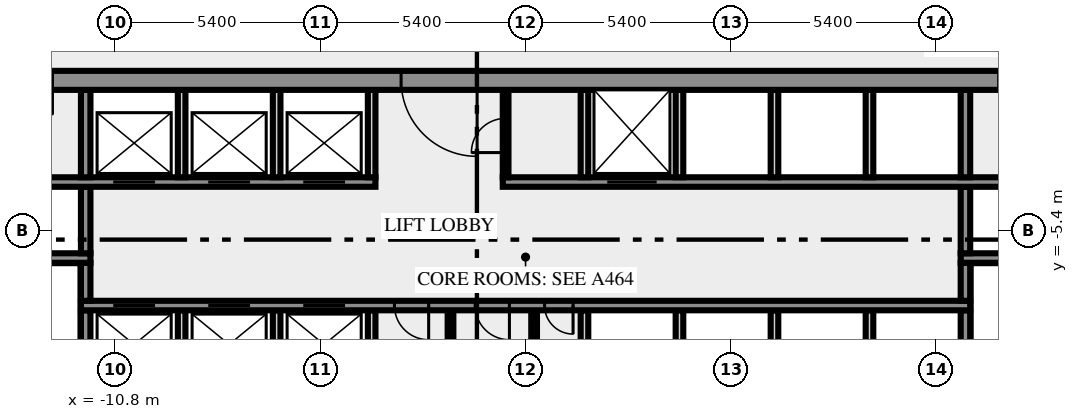
"""IFC4 building model, lengths in metres.
Left out: names, types, materials, properties, quantities, classifications, styles, units other than length and angle.
Written with IfcOpenShell. Run it as: python <this file> out.ifc"""

import sys

from ifc_helpers import new_model, si_unit, direction, frame, frame_2d, origin, place, context, subcontext, project, spatial, rectangle, extrude, element, fill, save


model = new_model("IFC4")
c1 = context("Model", 3, precision=1e-05, world=origin(), true_north=direction((0.0, 1.0)))
c2 = subcontext(c1, "Body", "Model", "MODEL_VIEW")
j1 = project(units=[si_unit("LENGTHUNIT", "METRE"), si_unit("PLANEANGLEUNIT", "RADIAN")], contexts=[c1])
p1 = place(None, origin())
s1 = spatial("IfcSite", under=j1, at=p1, CompositionType="ELEMENT")
p2 = place(p1, origin())
s2 = spatial("IfcBuilding", under=s1, at=p2, CompositionType="ELEMENT")
p3 = place(p2, frame((0.0, 0.0, 85.0)))
s3 = spatial("IfcBuildingStorey", under=s2, at=p3, CompositionType="ELEMENT", Elevation=85.0)
p4 = place(p3, frame((-11.575, -10.5, 0.0), z_axis=(0.0, 0.0, 1.0), x_axis=(0.0, 1.0, 0.0)))
e1 = element("IfcWall", 1, at=p4, inside=s3, PredefinedType="SHEAR", context=c2, shape_type="SweptSolid", body=[
    extrude(rectangle(XDim=3.0, YDim=0.25, at=frame_2d((1.5, 0.0))), origin(), (0.0, 0.0, 1.0), 3.65),
])
for number, where, z_axis, x_axis in (
    (2, (-9.05, -10.5, 0.0), (0.0, 0.0, 1.0), (0.0, 1.0, 0.0)),
    (3, (-6.55, -10.5, 0.0), (0.0, 0.0, 1.0), (0.0, 1.0, 0.0)),
    (4, (-4.05, -10.5, 0.0), (0.0, 0.0, 1.0), (0.0, 1.0, 0.0)),
):
    element("IfcWall", number, at=place(p3, frame(where, z_axis=z_axis, x_axis=x_axis)), inside=s3, PredefinedType="SOLIDWALL", context=c2, shape_type="SweptSolid", body=[
        extrude(rectangle(XDim=3.0, YDim=0.2, at=frame_2d((1.5, 0.0))), origin(), (0.0, 0.0, 1.0), 3.65),
    ])
for number, where, z_axis, x_axis in (
    (5, (-1.975, -10.5, 0.0), (0.0, 0.0, 1.0), (0.0, 1.0, 0.0)),
    (6, (0.225, -10.5, 0.0), (0.0, 0.0, 1.0), (0.0, 1.0, 0.0)),
):
    element("IfcWall", number, at=place(p3, frame(where, z_axis=z_axis, x_axis=x_axis)), inside=s3, PredefinedType="PARTITIONING", context=c2, shape_type="SweptSolid", body=[
        extrude(rectangle(XDim=3.0, YDim=0.15, at=frame_2d((1.5, 0.0))), origin(), (0.0, 0.0, 1.0), 3.65),
    ])
for number, where, z_axis, x_axis in (
    (7, (1.55, -10.5, 0.0), (0.0, 0.0, 1.0), (0.0, 1.0, 0.0)),
    (8, (4.05, -10.5, 0.0), (0.0, 0.0, 1.0), (0.0, 1.0, 0.0)),
    (9, (6.55, -10.5, 0.0), (0.0, 0.0, 1.0), (0.0, 1.0, 0.0)),
    (10, (9.05, -10.5, 0.0), (0.0, 0.0, 1.0), (0.0, 1.0, 0.0)),
):
    element("IfcWall", number, at=place(p3, frame(where, z_axis=z_axis, x_axis=x_axis)), inside=s3, PredefinedType="SOLIDWALL", context=c2, shape_type="SweptSolid", body=[
        extrude(rectangle(XDim=3.0, YDim=0.2, at=frame_2d((1.5, 0.0))), origin(), (0.0, 0.0, 1.0), 3.65),
    ])
p5 = place(p3, frame((11.575, -10.5, 0.0), z_axis=(0.0, 0.0, 1.0), x_axis=(0.0, 1.0, 0.0)))
e11 = element("IfcWall", 11, at=p5, inside=s3, PredefinedType="SHEAR", context=c2, shape_type="SweptSolid", body=[
    extrude(rectangle(XDim=3.0, YDim=0.25, at=frame_2d((1.5, 0.0))), origin(), (0.0, 0.0, 1.0), 3.65),
])
p6 = place(p3, frame((11.7, -7.375, 0.0), z_axis=(0.0, 0.0, 1.0), x_axis=(-1.0, 0.0, 0.0)))
e12 = element("IfcWall", 12, at=p6, inside=s3, PredefinedType="SHEAR", context=c2, shape_type="SweptSolid", body=[
    extrude(rectangle(XDim=23.4, YDim=0.25, at=frame_2d((11.7, 0.0))), origin(), (0.0, 0.0, 1.0), 3.65),
])
p7 = place(p6, frame((21.45, 0.0, 0.0)))
e13 = element("IfcOpeningElement", 13, at=p7, cuts=e12, PredefinedType="OPENING", context=c2, shape_type="SweptSolid", body=[
    extrude(rectangle(XDim=1.1, YDim=2.1, at=frame_2d((0.55, 1.05))), frame((0.0, 0.135, 0.0), z_axis=(0.0, -1.0, 0.0), x_axis=(1.0, 0.0, 0.0)), (0.0, 0.0, 1.0), 0.27),
])
p8 = place(p6, frame((18.95, 0.0, 0.0)))
e14 = element("IfcOpeningElement", 14, at=p8, cuts=e12, PredefinedType="OPENING", context=c2, shape_type="SweptSolid", body=[
    extrude(rectangle(XDim=1.1, YDim=2.1, at=frame_2d((0.55, 1.05))), frame((0.0, 0.135, 0.0), z_axis=(0.0, -1.0, 0.0), x_axis=(1.0, 0.0, 0.0)), (0.0, 0.0, 1.0), 0.27),
])
p9 = place(p6, frame((16.45, 0.0, 0.0)))
e15 = element("IfcOpeningElement", 15, at=p9, cuts=e12, PredefinedType="OPENING", context=c2, shape_type="SweptSolid", body=[
    extrude(rectangle(XDim=1.1, YDim=2.1, at=frame_2d((0.55, 1.05))), frame((0.0, 0.135, 0.0), z_axis=(0.0, -1.0, 0.0), x_axis=(1.0, 0.0, 0.0)), (0.0, 0.0, 1.0), 0.27),
])
p10 = place(p6, frame((14.25, 0.0, 0.0)))
e16 = element("IfcOpeningElement", 16, at=p10, cuts=e12, PredefinedType="OPENING", context=c2, shape_type="SweptSolid", body=[
    extrude(rectangle(XDim=0.9, YDim=2.1, at=frame_2d((0.45, 1.05))), frame((0.0, 0.135, 0.0), z_axis=(0.0, -1.0, 0.0), x_axis=(1.0, 0.0, 0.0)), (0.0, 0.0, 1.0), 0.27),
])
p11 = place(p6, frame((12.125, 0.0, 0.0)))
e17 = element("IfcOpeningElement", 17, at=p11, cuts=e12, PredefinedType="OPENING", context=c2, shape_type="SweptSolid", body=[
    extrude(rectangle(XDim=0.9, YDim=2.1, at=frame_2d((0.45, 1.05))), frame((0.0, 0.135, 0.0), z_axis=(0.0, -1.0, 0.0), x_axis=(1.0, 0.0, 0.0)), (0.0, 0.0, 1.0), 0.27),
])
p12 = place(p6, frame((10.45, 0.0, 0.0)))
e18 = element("IfcOpeningElement", 18, at=p12, cuts=e12, PredefinedType="OPENING", context=c2, shape_type="SweptSolid", body=[
    extrude(rectangle(XDim=0.75, YDim=2.1, at=frame_2d((0.375, 1.05))), frame((0.0, 0.135, 0.0), z_axis=(0.0, -1.0, 0.0), x_axis=(1.0, 0.0, 0.0)), (0.0, 0.0, 1.0), 0.27),
])
for number, where, z_axis, x_axis in (
    (19, (-11.575, -7.25, 0.0), (0.0, 0.0, 1.0), (0.0, 1.0, 0.0)),
    (20, (11.575, -7.25, 0.0), (0.0, 0.0, 1.0), (0.0, 1.0, 0.0)),
):
    element("IfcWall", number, at=place(p3, frame(where, z_axis=z_axis, x_axis=x_axis)), inside=s3, PredefinedType="SHEAR", context=c2, shape_type="SweptSolid", body=[
        extrude(rectangle(XDim=1.0, YDim=0.25, at=frame_2d((0.5, 0.0))), origin(), (0.0, 0.0, 1.0), 3.65),
    ])
p13 = place(p3, frame((-11.45, -6.125, 0.0), z_axis=(0.0, 0.0, 1.0), x_axis=(-1.0, 0.0, 0.0)))
e21 = element("IfcWall", 21, at=p13, inside=s3, PredefinedType="SHEAR", context=c2, shape_type="SweptSolid", body=[
    extrude(rectangle(XDim=8.05, YDim=0.25, at=frame_2d((4.025, 0.0))), origin(), (0.0, 0.0, 1.0), 3.65),
])
p14 = place(p13, frame((6.2, 0.0, 0.0)))
e22 = element("IfcOpeningElement", 22, at=p14, cuts=e21, PredefinedType="OPENING", context=c2, shape_type="SweptSolid", body=[
    extrude(rectangle(XDim=1.8, YDim=2.1, at=frame_2d((0.9, 1.05))), frame((0.0, 0.135, 0.0), z_axis=(0.0, -1.0, 0.0), x_axis=(1.0, 0.0, 0.0)), (0.0, 0.0, 1.0), 0.27),
])
p15 = place(p3, frame((19.5, -6.125, 0.0), z_axis=(0.0, 0.0, 1.0), x_axis=(-1.0, 0.0, 0.0)))
e23 = element("IfcWall", 23, at=p15, inside=s3, PredefinedType="SHEAR", context=c2, shape_type="SweptSolid", body=[
    extrude(rectangle(XDim=8.05, YDim=0.25, at=frame_2d((4.025, 0.0))), origin(), (0.0, 0.0, 1.0), 3.65),
])
p16 = place(p15, frame((0.05, 0.0, 0.0)))
e24 = element("IfcOpeningElement", 24, at=p16, cuts=e23, PredefinedType="OPENING", context=c2, shape_type="SweptSolid", body=[
    extrude(rectangle(XDim=1.8, YDim=2.1, at=frame_2d((0.9, 1.05))), frame((0.0, 0.135, 0.0), z_axis=(0.0, -1.0, 0.0), x_axis=(1.0, 0.0, 0.0)), (0.0, 0.0, 1.0), 0.27),
])
for number, where, z_axis, x_axis in (
    (25, (-11.575, -6.0, 0.0), (0.0, 0.0, 1.0), (0.0, 1.0, 0.0)),
    (26, (11.575, -6.0, 0.0), (0.0, 0.0, 1.0), (0.0, 1.0, 0.0)),
):
    element("IfcWall", number, at=place(p3, frame(where, z_axis=z_axis, x_axis=x_axis)), inside=s3, PredefinedType="SHEAR", context=c2, shape_type="SweptSolid", body=[
        extrude(rectangle(XDim=1.75, YDim=0.25, at=frame_2d((0.875, 0.0))), origin(), (0.0, 0.0, 1.0), 3.65),
    ])
p17 = place(p3, frame((-14.35, -4.125, 0.0), z_axis=(0.0, 0.0, 1.0), x_axis=(1.0, 0.0, 0.0)))
e27 = element("IfcWall", 27, at=p17, inside=s3, PredefinedType="SHEAR", context=c2, shape_type="SweptSolid", body=[
    extrude(rectangle(XDim=10.4, YDim=0.25, at=frame_2d((5.2, 0.0))), origin(), (0.0, 0.0, 1.0), 3.65),
])
p18 = place(p17, frame((3.5, 0.0, 0.0)))
e28 = element("IfcOpeningElement", 28, at=p18, cuts=e27, PredefinedType="OPENING", context=c2, shape_type="SweptSolid", body=[
    extrude(rectangle(XDim=1.1, YDim=2.1, at=frame_2d((0.55, 1.05))), frame((0.0, 0.135, 0.0), z_axis=(0.0, -1.0, 0.0), x_axis=(1.0, 0.0, 0.0)), (0.0, 0.0, 1.0), 0.27),
])
p19 = place(p17, frame((6.0, 0.0, 0.0)))
e29 = element("IfcOpeningElement", 29, at=p19, cuts=e27, PredefinedType="OPENING", context=c2, shape_type="SweptSolid", body=[
    extrude(rectangle(XDim=1.1, YDim=2.1, at=frame_2d((0.55, 1.05))), frame((0.0, 0.135, 0.0), z_axis=(0.0, -1.0, 0.0), x_axis=(1.0, 0.0, 0.0)), (0.0, 0.0, 1.0), 0.27),
])
p20 = place(p17, frame((8.5, 0.0, 0.0)))
e30 = element("IfcOpeningElement", 30, at=p20, cuts=e27, PredefinedType="OPENING", context=c2, shape_type="SweptSolid", body=[
    extrude(rectangle(XDim=1.1, YDim=2.1, at=frame_2d((0.55, 1.05))), frame((0.0, 0.135, 0.0), z_axis=(0.0, -1.0, 0.0), x_axis=(1.0, 0.0, 0.0)), (0.0, 0.0, 1.0), 0.27),
])
p21 = place(p3, frame((-0.6, -4.125, 0.0), z_axis=(0.0, 0.0, 1.0), x_axis=(1.0, 0.0, 0.0)))
e31 = element("IfcWall", 31, at=p21, inside=s3, PredefinedType="SHEAR", context=c2, shape_type="SweptSolid", body=[
    extrude(rectangle(XDim=14.95, YDim=0.25, at=frame_2d((7.475, 0.0))), origin(), (0.0, 0.0, 1.0), 3.65),
])
p22 = place(p21, frame((2.75, 0.0, 0.0)))
e32 = element("IfcOpeningElement", 32, at=p22, cuts=e31, PredefinedType="OPENING", context=c2, shape_type="SweptSolid", body=[
    extrude(rectangle(XDim=1.3, YDim=2.1, at=frame_2d((0.65, 1.05))), frame((0.0, 0.135, 0.0), z_axis=(0.0, -1.0, 0.0), x_axis=(1.0, 0.0, 0.0)), (0.0, 0.0, 1.0), 0.27),
])
p23 = place(p3, frame((-11.575, -4.0, 0.0), z_axis=(0.0, 0.0, 1.0), x_axis=(0.0, 1.0, 0.0)))
e33 = element("IfcWall", 33, at=p23, inside=s3, PredefinedType="SHEAR", context=c2, shape_type="SweptSolid", body=[
    extrude(rectangle(XDim=2.3, YDim=0.25, at=frame_2d((1.15, 0.0))), origin(), (0.0, 0.0, 1.0), 3.65),
])
for number, where, z_axis, x_axis in (
    (34, (-9.05, -4.0, 0.0), (0.0, 0.0, 1.0), (0.0, 1.0, 0.0)),
    (35, (-6.55, -4.0, 0.0), (0.0, 0.0, 1.0), (0.0, 1.0, 0.0)),
    (36, (-4.05, -4.0, 0.0), (0.0, 0.0, 1.0), (0.0, 1.0, 0.0)),
):
    element("IfcWall", number, at=place(p3, frame(where, z_axis=z_axis, x_axis=x_axis)), inside=s3, PredefinedType="SOLIDWALL", context=c2, shape_type="SweptSolid", body=[
        extrude(rectangle(XDim=2.3, YDim=0.2, at=frame_2d((1.15, 0.0))), origin(), (0.0, 0.0, 1.0), 3.65),
    ])
p24 = place(p3, frame((-0.525, -4.0, 0.0), z_axis=(0.0, 0.0, 1.0), x_axis=(0.0, 1.0, 0.0)))
e37 = element("IfcWall", 37, at=p24, inside=s3, PredefinedType="PARTITIONING", context=c2, shape_type="SweptSolid", body=[
    extrude(rectangle(XDim=2.3, YDim=0.15, at=frame_2d((1.15, 0.0))), origin(), (0.0, 0.0, 1.0), 3.65),
])
p25 = place(p24, frame((0.65, 0.0, 0.0)))
e38 = element("IfcOpeningElement", 38, at=p25, cuts=e37, PredefinedType="OPENING", context=c2, shape_type="SweptSolid", body=[
    extrude(rectangle(XDim=0.9, YDim=2.1, at=frame_2d((0.45, 1.05))), frame((0.0, 0.085, 0.0), z_axis=(0.0, -1.0, 0.0), x_axis=(1.0, 0.0, 0.0)), (0.0, 0.0, 1.0), 0.17),
])
for number, where, z_axis, x_axis in (
    (39, (1.55, -4.0, 0.0), (0.0, 0.0, 1.0), (0.0, 1.0, 0.0)),
    (40, (4.05, -4.0, 0.0), (0.0, 0.0, 1.0), (0.0, 1.0, 0.0)),
    (41, (6.55, -4.0, 0.0), (0.0, 0.0, 1.0), (0.0, 1.0, 0.0)),
    (42, (9.05, -4.0, 0.0), (0.0, 0.0, 1.0), (0.0, 1.0, 0.0)),
):
    element("IfcWall", number, at=place(p3, frame(where, z_axis=z_axis, x_axis=x_axis)), inside=s3, PredefinedType="SOLIDWALL", context=c2, shape_type="SweptSolid", body=[
        extrude(rectangle(XDim=2.3, YDim=0.2, at=frame_2d((1.15, 0.0))), origin(), (0.0, 0.0, 1.0), 3.65),
    ])
p26 = place(p3, frame((11.575, -4.0, 0.0), z_axis=(0.0, 0.0, 1.0), x_axis=(0.0, 1.0, 0.0)))
e43 = element("IfcWall", 43, at=p26, inside=s3, PredefinedType="SHEAR", context=c2, shape_type="SweptSolid", body=[
    extrude(rectangle(XDim=2.3, YDim=0.25, at=frame_2d((1.15, 0.0))), origin(), (0.0, 0.0, 1.0), 3.65),
])
p27 = place(p3, frame((20.49, -1.45, 0.0), z_axis=(0.0, 0.0, 1.0), x_axis=(-1.0, 0.0, 0.0)))
e44 = element("IfcWall", 44, at=p27, inside=s3, PredefinedType="SHEAR", context=c2, shape_type="SweptSolid", body=[
    extrude(rectangle(XDim=40.98, YDim=0.5, at=frame_2d((20.49, 0.0))), origin(), (0.0, 0.0, 1.0), 3.65),
])
p28 = place(p27, frame((38.14, 0.0, 0.0)))
e45 = element("IfcOpeningElement", 45, at=p28, cuts=e44, PredefinedType="OPENING", context=c2, shape_type="SweptSolid", body=[
    extrude(rectangle(XDim=1.8, YDim=2.1, at=frame_2d((0.9, 1.05))), frame((0.0, 0.26, 0.0), z_axis=(0.0, -1.0, 0.0), x_axis=(1.0, 0.0, 0.0)), (0.0, 0.0, 1.0), 0.52),
])
p29 = place(p27, frame((35.89, 0.0, 0.0)))
e46 = element("IfcOpeningElement", 46, at=p29, cuts=e44, PredefinedType="OPENING", context=c2, shape_type="SweptSolid", body=[
    extrude(rectangle(XDim=0.9, YDim=2.1, at=frame_2d((0.45, 1.05))), frame((0.0, 0.26, 0.0), z_axis=(0.0, -1.0, 0.0), x_axis=(1.0, 0.0, 0.0)), (0.0, 0.0, 1.0), 0.52),
])
p30 = place(p27, frame((32.94, 0.0, 0.0)))
e47 = element("IfcOpeningElement", 47, at=p30, cuts=e44, PredefinedType="OPENING", context=c2, shape_type="SweptSolid", body=[
    extrude(rectangle(XDim=0.9, YDim=2.1, at=frame_2d((0.45, 1.05))), frame((0.0, 0.26, 0.0), z_axis=(0.0, -1.0, 0.0), x_axis=(1.0, 0.0, 0.0)), (0.0, 0.0, 1.0), 0.52),
])
p31 = place(p27, frame((21.765, 0.0, 0.0)))
e48 = element("IfcOpeningElement", 48, at=p31, cuts=e44, PredefinedType="OPENING", context=c2, shape_type="SweptSolid", body=[
    extrude(rectangle(XDim=2.0, YDim=2.1, at=frame_2d((1.0, 1.05))), frame((0.0, 0.26, 0.0), z_axis=(0.0, -1.0, 0.0), x_axis=(1.0, 0.0, 0.0)), (0.0, 0.0, 1.0), 0.52),
])
p32 = place(p27, frame((7.14, 0.0, 0.0)))
e49 = element("IfcOpeningElement", 49, at=p32, cuts=e44, PredefinedType="OPENING", context=c2, shape_type="SweptSolid", body=[
    extrude(rectangle(XDim=0.9, YDim=2.1, at=frame_2d((0.45, 1.05))), frame((0.0, 0.26, 0.0), z_axis=(0.0, -1.0, 0.0), x_axis=(1.0, 0.0, 0.0)), (0.0, 0.0, 1.0), 0.52),
])
p33 = place(p27, frame((5.028, 0.0, 0.0)))
e50 = element("IfcOpeningElement", 50, at=p33, cuts=e44, PredefinedType="OPENING", context=c2, shape_type="SweptSolid", body=[
    extrude(rectangle(XDim=0.8, YDim=2.1, at=frame_2d((0.4, 1.05))), frame((0.0, 0.26, 0.0), z_axis=(0.0, -1.0, 0.0), x_axis=(1.0, 0.0, 0.0)), (0.0, 0.0, 1.0), 0.52),
])
p34 = place(p27, frame((3.452, 0.0, 0.0)))
e51 = element("IfcOpeningElement", 51, at=p34, cuts=e44, PredefinedType="OPENING", context=c2, shape_type="SweptSolid", body=[
    extrude(rectangle(XDim=0.8, YDim=2.1, at=frame_2d((0.4, 1.05))), frame((0.0, 0.26, 0.0), z_axis=(0.0, -1.0, 0.0), x_axis=(1.0, 0.0, 0.0)), (0.0, 0.0, 1.0), 0.52),
])
p35 = place(p27, frame((1.04, 0.0, 0.0)))
e52 = element("IfcOpeningElement", 52, at=p35, cuts=e44, PredefinedType="OPENING", context=c2, shape_type="SweptSolid", body=[
    extrude(rectangle(XDim=1.8, YDim=2.1, at=frame_2d((0.9, 1.05))), frame((0.0, 0.26, 0.0), z_axis=(0.0, -1.0, 0.0), x_axis=(1.0, 0.0, 0.0)), (0.0, 0.0, 1.0), 0.52),
])
p36 = place(p7, origin())
e53 = element("IfcDoor", 53, at=p36, inside=s3, OperationType="DOUBLE_DOOR_SLIDING", PredefinedType="DOOR", context=c2, shape_type="SweptSolid", body=[
    extrude(rectangle(XDim=1.1, YDim=2.1, at=frame_2d((0.55, 1.05))), frame((0.0, 0.025, 0.0), z_axis=(0.0, -1.0, 0.0), x_axis=(1.0, 0.0, 0.0)), (0.0, 0.0, 1.0), 0.05),
])
fill(e13, e53)
p37 = place(p8, origin())
e54 = element("IfcDoor", 54, at=p37, inside=s3, OperationType="DOUBLE_DOOR_SLIDING", PredefinedType="DOOR", context=c2, shape_type="SweptSolid", body=[
    extrude(rectangle(XDim=1.1, YDim=2.1, at=frame_2d((0.55, 1.05))), frame((0.0, 0.025, 0.0), z_axis=(0.0, -1.0, 0.0), x_axis=(1.0, 0.0, 0.0)), (0.0, 0.0, 1.0), 0.05),
])
fill(e14, e54)
p38 = place(p9, origin())
e55 = element("IfcDoor", 55, at=p38, inside=s3, OperationType="DOUBLE_DOOR_SLIDING", PredefinedType="DOOR", context=c2, shape_type="SweptSolid", body=[
    extrude(rectangle(XDim=1.1, YDim=2.1, at=frame_2d((0.55, 1.05))), frame((0.0, 0.025, 0.0), z_axis=(0.0, -1.0, 0.0), x_axis=(1.0, 0.0, 0.0)), (0.0, 0.0, 1.0), 0.05),
])
fill(e15, e55)
p39 = place(p10, origin())
e56 = element("IfcDoor", 56, at=p39, inside=s3, OperationType="SINGLE_SWING_RIGHT", PredefinedType="DOOR", context=c2, shape_type="SweptSolid", body=[
    extrude(rectangle(XDim=0.9, YDim=2.1, at=frame_2d((0.45, 1.05))), frame((0.0, 0.025, 0.0), z_axis=(0.0, -1.0, 0.0), x_axis=(1.0, 0.0, 0.0)), (0.0, 0.0, 1.0), 0.05),
])
fill(e16, e56)
p40 = place(p11, origin())
e57 = element("IfcDoor", 57, at=p40, inside=s3, OperationType="SINGLE_SWING_RIGHT", PredefinedType="DOOR", context=c2, shape_type="SweptSolid", body=[
    extrude(rectangle(XDim=0.9, YDim=2.1, at=frame_2d((0.45, 1.05))), frame((0.0, 0.025, 0.0), z_axis=(0.0, -1.0, 0.0), x_axis=(1.0, 0.0, 0.0)), (0.0, 0.0, 1.0), 0.05),
])
fill(e17, e57)
p41 = place(p12, origin())
e58 = element("IfcDoor", 58, at=p41, inside=s3, OperationType="SINGLE_SWING_LEFT", PredefinedType="DOOR", context=c2, shape_type="SweptSolid", body=[
    extrude(rectangle(XDim=0.75, YDim=2.1, at=frame_2d((0.375, 1.05))), frame((0.0, 0.025, 0.0), z_axis=(0.0, -1.0, 0.0), x_axis=(1.0, 0.0, 0.0)), (0.0, 0.0, 1.0), 0.05),
])
fill(e18, e58)
p42 = place(p18, origin())
e59 = element("IfcDoor", 59, at=p42, inside=s3, OperationType="DOUBLE_DOOR_SLIDING", PredefinedType="DOOR", context=c2, shape_type="SweptSolid", body=[
    extrude(rectangle(XDim=1.1, YDim=2.1, at=frame_2d((0.55, 1.05))), frame((0.0, 0.025, 0.0), z_axis=(0.0, -1.0, 0.0), x_axis=(1.0, 0.0, 0.0)), (0.0, 0.0, 1.0), 0.05),
])
fill(e28, e59)
p43 = place(p19, origin())
e60 = element("IfcDoor", 60, at=p43, inside=s3, OperationType="DOUBLE_DOOR_SLIDING", PredefinedType="DOOR", context=c2, shape_type="SweptSolid", body=[
    extrude(rectangle(XDim=1.1, YDim=2.1, at=frame_2d((0.55, 1.05))), frame((0.0, 0.025, 0.0), z_axis=(0.0, -1.0, 0.0), x_axis=(1.0, 0.0, 0.0)), (0.0, 0.0, 1.0), 0.05),
])
fill(e29, e60)
p44 = place(p20, origin())
e61 = element("IfcDoor", 61, at=p44, inside=s3, OperationType="DOUBLE_DOOR_SLIDING", PredefinedType="DOOR", context=c2, shape_type="SweptSolid", body=[
    extrude(rectangle(XDim=1.1, YDim=2.1, at=frame_2d((0.55, 1.05))), frame((0.0, 0.025, 0.0), z_axis=(0.0, -1.0, 0.0), x_axis=(1.0, 0.0, 0.0)), (0.0, 0.0, 1.0), 0.05),
])
fill(e30, e61)
p45 = place(p22, origin())
e62 = element("IfcDoor", 62, at=p45, inside=s3, OperationType="DOUBLE_DOOR_SLIDING", PredefinedType="DOOR", context=c2, shape_type="SweptSolid", body=[
    extrude(rectangle(XDim=1.3, YDim=2.1, at=frame_2d((0.65, 1.05))), frame((0.0, 0.025, 0.0), z_axis=(0.0, -1.0, 0.0), x_axis=(1.0, 0.0, 0.0)), (0.0, 0.0, 1.0), 0.05),
])
fill(e32, e62)
p46 = place(p25, origin())
e63 = element("IfcDoor", 63, at=p46, inside=s3, OperationType="SINGLE_SWING_LEFT", PredefinedType="DOOR", context=c2, shape_type="SweptSolid", body=[
    extrude(rectangle(XDim=0.9, YDim=2.1, at=frame_2d((0.45, 1.05))), frame((0.0, 0.025, 0.0), z_axis=(0.0, -1.0, 0.0), x_axis=(1.0, 0.0, 0.0)), (0.0, 0.0, 1.0), 0.05),
])
fill(e38, e63)
p47 = place(p31, origin())
e64 = element("IfcDoor", 64, at=p47, inside=s3, OperationType="DOUBLE_DOOR_SINGLE_SWING", PredefinedType="DOOR", context=c2, shape_type="SweptSolid", body=[
    extrude(rectangle(XDim=2.0, YDim=2.1, at=frame_2d((1.0, 1.05))), frame((0.0, 0.025, 0.0), z_axis=(0.0, -1.0, 0.0), x_axis=(1.0, 0.0, 0.0)), (0.0, 0.0, 1.0), 0.05),
])
fill(e48, e64)
save(model, sys.argv[1])
